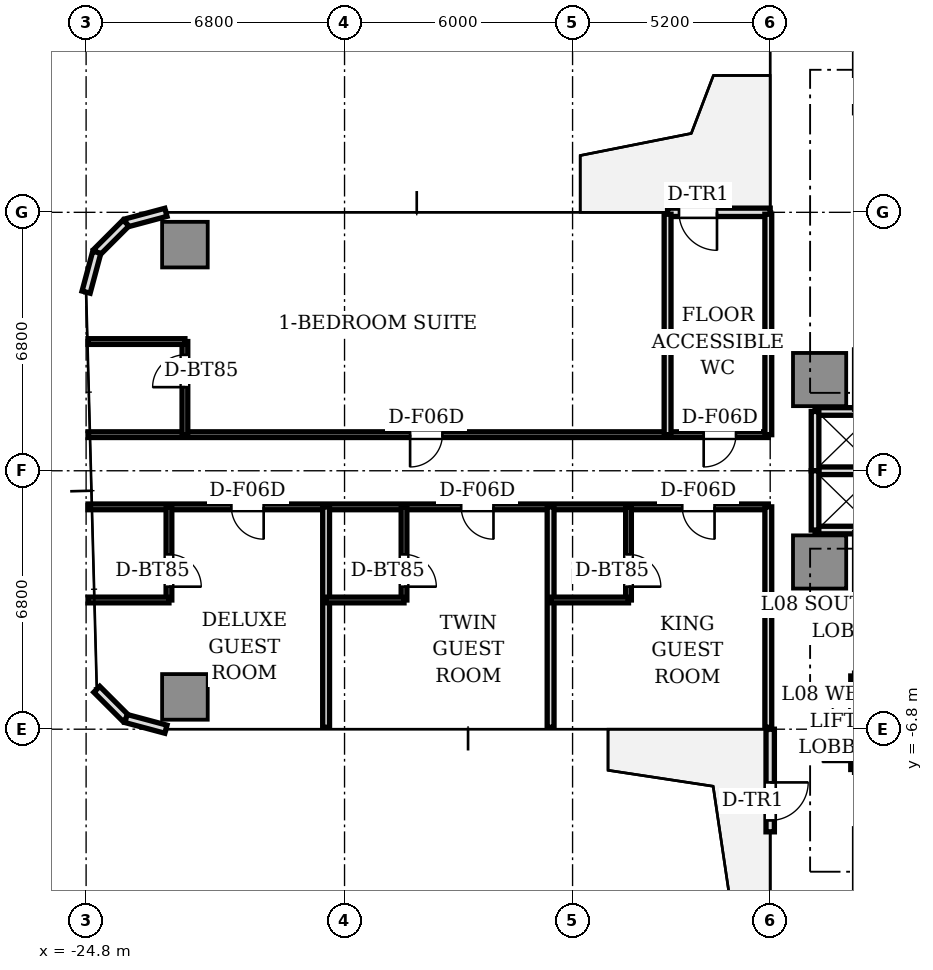
"""IFC4 building model, lengths in metres.
Left out: names, types, materials, properties, quantities, classifications, styles, units other than length and angle.
Written with IfcOpenShell. Run it as: python <this file> out.ifc"""

import sys

from ifc_helpers import new_model, si_unit, direction, frame, frame_2d, origin, origin_2d, place, context, subcontext, project, spatial, rectangle, extrude, source, transform, mapped, element, fill, save


model = new_model("IFC4")
c1 = context("Model", 3, precision=1e-05, world=origin(), true_north=direction((0.0, 1.0)))
c2 = subcontext(c1, "Body", "Model", "MODEL_VIEW")
j1 = project(units=[si_unit("LENGTHUNIT", "METRE"), si_unit("PLANEANGLEUNIT", "RADIAN")], contexts=[c1])
p1 = place(None, origin())
s1 = spatial("IfcSite", under=j1, at=p1, CompositionType="ELEMENT")
p2 = place(p1, origin())
s2 = spatial("IfcBuilding", under=s1, at=p2, CompositionType="ELEMENT")
p3 = place(p2, frame((0.0, 0.0, 33.15)))
s3 = spatial("IfcBuildingStorey", under=s2, at=p3, CompositionType="ELEMENT", Elevation=33.15)
m1 = source(origin(), c2, "Body", "SweptSolid", [
    extrude(rectangle(XDim=1.4, YDim=1.4, at=origin_2d()), origin(), (0.0, 0.0, 1.0), 3.11),
])
for number, where, z_axis, x_axis in (
    (1, (-5.5, 2.4, 0.0), (0.0, 0.0, 1.0), (1.0, 0.0, 0.0)),
    (2, (-5.5, -2.4, 0.0), (0.0, 0.0, 1.0), (1.0, 0.0, 0.0)),
):
    element("IfcColumn", number, at=place(p3, frame(where, z_axis=z_axis, x_axis=x_axis)), inside=s3, PredefinedType="COLUMN", context=c2, shape_type="MappedRepresentation", body=[
        mapped(m1, transform((0.0, 0.0, 0.0), scale=1.0)),
    ])
m2 = source(origin(), c2, "Body", "SweptSolid", [
    extrude(rectangle(XDim=1.2, YDim=1.2, at=origin_2d()), origin(), (0.0, 0.0, 1.0), 3.11),
])
for number, where, z_axis, x_axis in (
    (3, (-22.2, 5.95, 0.0), (0.0, 0.0, 1.0), (1.0, 0.0, 0.0)),
    (4, (-22.2, -5.95, 0.0), (0.0, 0.0, 1.0), (1.0, 0.0, 0.0)),
):
    element("IfcColumn", number, at=place(p3, frame(where, z_axis=z_axis, x_axis=x_axis)), inside=s3, PredefinedType="COLUMN", context=c2, shape_type="MappedRepresentation", body=[
        mapped(m2, transform((0.0, 0.0, 0.0), scale=1.0)),
    ])
p4 = place(p3, frame((-6.8, 6.8, 0.0), z_axis=(0.0, 0.0, 1.0), x_axis=(-1.0, 0.0, 0.0)))
e5 = element("IfcWall", 5, at=p4, inside=s3, PredefinedType="STANDARD", context=c2, shape_type="SweptSolid", body=[
    extrude(rectangle(XDim=2.7, YDim=0.22, at=frame_2d((1.35, 0.0))), origin(), (0.0, 0.0, 1.0), 3.11),
])
p5 = place(p4, frame((1.4, 0.0, 0.0)))
e6 = element("IfcOpeningElement", 6, at=p5, cuts=e5, PredefinedType="OPENING", context=c2, shape_type="SweptSolid", body=[
    extrude(rectangle(XDim=1.0, YDim=2.2, at=frame_2d((0.5, 1.1))), frame((0.0, 0.12, 0.0), z_axis=(0.0, -1.0, 0.0), x_axis=(1.0, 0.0, 0.0)), (0.0, 0.0, 1.0), 0.24),
])
for number, where, z_axis, x_axis in (
    (7, (-22.7, 6.8, 0.0), (0.0, 0.0, 1.0), (-0.966, -0.259, 0.0)),
    (8, (-23.75, 6.519, 0.0), (0.0, 0.0, 1.0), (-0.707, -0.707, 0.0)),
    (9, (-24.519, 5.75, 0.0), (0.0, 0.0, 1.0), (-0.259, -0.966, 0.0)),
    (10, (-24.519, -5.75, 0.0), (0.0, 0.0, 1.0), (0.707, -0.707, 0.0)),
    (11, (-23.75, -6.519, 0.0), (0.0, 0.0, 1.0), (0.966, -0.259, 0.0)),
):
    element("IfcWall", number, at=place(p3, frame(where, z_axis=z_axis, x_axis=x_axis)), inside=s3, PredefinedType="STANDARD", context=c2, shape_type="SweptSolid", body=[
        extrude(rectangle(XDim=1.087, YDim=0.22, at=frame_2d((0.543, 0.0))), origin(), (0.0, 0.0, 1.0), 3.11),
    ])
p6 = place(p3, frame((-6.8, -6.8, 0.0), z_axis=(0.0, 0.0, 1.0), x_axis=(0.0, -1.0, 0.0)))
e12 = element("IfcWall", 12, at=p6, inside=s3, PredefinedType="STANDARD", context=c2, shape_type="SweptSolid", body=[
    extrude(rectangle(XDim=2.7, YDim=0.22, at=frame_2d((1.35, 0.0))), origin(), (0.0, 0.0, 1.0), 3.11),
])
p7 = place(p6, frame((1.4, 0.0, 0.0)))
e13 = element("IfcOpeningElement", 13, at=p7, cuts=e12, PredefinedType="OPENING", context=c2, shape_type="SweptSolid", body=[
    extrude(rectangle(XDim=1.0, YDim=2.2, at=frame_2d((0.5, 1.1))), frame((0.0, 0.12, 0.0), z_axis=(0.0, -1.0, 0.0), x_axis=(1.0, 0.0, 0.0)), (0.0, 0.0, 1.0), 0.24),
])
for number, where, z_axis, x_axis in (
    (14, (-5.62, 1.56, 0.0), (0.0, 0.0, 1.0), (1.0, 0.0, 0.0)),
    (15, (-5.62, -1.56, 0.0), (0.0, 0.0, 1.0), (1.0, 0.0, 0.0)),
    (16, (-5.62, 0.0, 0.0), (0.0, 0.0, 1.0), (1.0, 0.0, 0.0)),
):
    element("IfcWall", number, at=place(p3, frame(where, z_axis=z_axis, x_axis=x_axis)), inside=s3, PredefinedType="SOLIDWALL", context=c2, shape_type="SweptSolid", body=[
        extrude(rectangle(XDim=1.64, YDim=0.2, at=frame_2d((0.82, 0.0))), origin(), (0.0, 0.0, 1.0), 2.66),
    ])
for number, where, z_axis, x_axis in (
    (17, (-5.62, 0.0, 0.0), (0.0, 0.0, 1.0), (0.0, 1.0, 0.0)),
    (18, (-5.62, -1.56, 0.0), (0.0, 0.0, 1.0), (0.0, 1.0, 0.0)),
):
    element("IfcWall", number, at=place(p3, frame(where, z_axis=z_axis, x_axis=x_axis)), inside=s3, PredefinedType="SOLIDWALL", context=c2, shape_type="SweptSolid", body=[
        extrude(rectangle(XDim=1.56, YDim=0.2, at=frame_2d((0.78, 0.0))), origin(), (0.0, 0.0, 1.0), 2.66),
    ])
p8 = place(p3, frame((-4.58, -7.86, 0.0), z_axis=(0.0, 0.0, 1.0), x_axis=(0.0, 1.0, 0.0)))
e19 = element("IfcWall", 19, at=p8, inside=s3, PredefinedType="SOLIDWALL", context=c2, shape_type="SweptSolid", body=[
    extrude(rectangle(XDim=2.46, YDim=0.2, at=frame_2d((1.23, 0.0))), origin(), (0.0, 0.0, 1.0), 2.66),
])
p9 = place(p8, frame((0.2, 0.0, 0.0)))
e20 = element("IfcOpeningElement", 20, at=p9, cuts=e19, PredefinedType="OPENING", context=c2, shape_type="SweptSolid", body=[
    extrude(rectangle(XDim=0.85, YDim=2.1, at=frame_2d((0.425, 1.05))), frame((0.0, 0.11, 0.0), z_axis=(0.0, -1.0, 0.0), x_axis=(1.0, 0.0, 0.0)), (0.0, 0.0, 1.0), 0.22),
])
p10 = place(p8, frame((1.38, 0.0, 0.0)))
e21 = element("IfcOpeningElement", 21, at=p10, cuts=e19, PredefinedType="OPENING", context=c2, shape_type="SweptSolid", body=[
    extrude(rectangle(XDim=0.85, YDim=2.1, at=frame_2d((0.425, 1.05))), frame((0.0, 0.11, 0.0), z_axis=(0.0, -1.0, 0.0), x_axis=(1.0, 0.0, 0.0)), (0.0, 0.0, 1.0), 0.22),
])
p11 = place(p3, frame((-6.85, -0.95, 0.0), z_axis=(0.0, 0.0, 1.0), x_axis=(-1.0, 0.0, 0.0)))
e22 = element("IfcWall", 22, at=p11, inside=s3, PredefinedType="PARTITIONING", context=c2, shape_type="SweptSolid", body=[
    extrude(rectangle(XDim=17.9, YDim=0.15, at=frame_2d((8.95, 0.0))), origin(), (0.0, 0.0, 1.0), 2.66),
])
p12 = place(p11, frame((1.414, 0.0, 0.0)))
e23 = element("IfcOpeningElement", 23, at=p12, cuts=e22, PredefinedType="OPENING", context=c2, shape_type="SweptSolid", body=[
    extrude(rectangle(XDim=0.85, YDim=2.1, at=frame_2d((0.425, 1.05))), frame((0.0, 0.085, 0.0), z_axis=(0.0, -1.0, 0.0), x_axis=(1.0, 0.0, 0.0)), (0.0, 0.0, 1.0), 0.17),
])
p13 = place(p11, frame((7.231, 0.0, 0.0)))
e24 = element("IfcOpeningElement", 24, at=p13, cuts=e22, PredefinedType="OPENING", context=c2, shape_type="SweptSolid", body=[
    extrude(rectangle(XDim=0.85, YDim=2.1, at=frame_2d((0.425, 1.05))), frame((0.0, 0.085, 0.0), z_axis=(0.0, -1.0, 0.0), x_axis=(1.0, 0.0, 0.0)), (0.0, 0.0, 1.0), 0.17),
])
p14 = place(p11, frame((13.278, 0.0, 0.0)))
e25 = element("IfcOpeningElement", 25, at=p14, cuts=e22, PredefinedType="OPENING", context=c2, shape_type="SweptSolid", body=[
    extrude(rectangle(XDim=0.85, YDim=2.1, at=frame_2d((0.425, 1.05))), frame((0.0, 0.085, 0.0), z_axis=(0.0, -1.0, 0.0), x_axis=(1.0, 0.0, 0.0)), (0.0, 0.0, 1.0), 0.17),
])
p15 = place(p3, frame((-6.85, 0.95, 0.0), z_axis=(0.0, 0.0, 1.0), x_axis=(-1.0, 0.0, 0.0)))
e26 = element("IfcWall", 26, at=p15, inside=s3, PredefinedType="PARTITIONING", context=c2, shape_type="SweptSolid", body=[
    extrude(rectangle(XDim=17.9, YDim=0.15, at=frame_2d((8.95, 0.0))), origin(), (0.0, 0.0, 1.0), 2.66),
])
p16 = place(p15, frame((0.85, 0.0, 0.0)))
e27 = element("IfcOpeningElement", 27, at=p16, cuts=e26, PredefinedType="OPENING", context=c2, shape_type="SweptSolid", body=[
    extrude(rectangle(XDim=0.85, YDim=2.1, at=frame_2d((0.425, 1.05))), frame((0.0, 0.085, 0.0), z_axis=(0.0, -1.0, 0.0), x_axis=(1.0, 0.0, 0.0)), (0.0, 0.0, 1.0), 0.17),
])
p17 = place(p15, frame((8.575, 0.0, 0.0)))
e28 = element("IfcOpeningElement", 28, at=p17, cuts=e26, PredefinedType="OPENING", context=c2, shape_type="SweptSolid", body=[
    extrude(rectangle(XDim=0.85, YDim=2.1, at=frame_2d((0.425, 1.05))), frame((0.0, 0.085, 0.0), z_axis=(0.0, -1.0, 0.0), x_axis=(1.0, 0.0, 0.0)), (0.0, 0.0, 1.0), 0.17),
])
for number, where, z_axis, x_axis in (
    (29, (-6.85, -0.95, 0.0), (0.0, 0.0, 1.0), (0.0, -1.0, 0.0)),
    (30, (-6.85, 6.75, 0.0), (0.0, 0.0, 1.0), (0.0, -1.0, 0.0)),
    (31, (-12.578, -0.95, 0.0), (0.0, 0.0, 1.0), (0.0, -1.0, 0.0)),
):
    element("IfcWall", number, at=place(p3, frame(where, z_axis=z_axis, x_axis=x_axis)), inside=s3, PredefinedType="PARTITIONING", context=c2, shape_type="SweptSolid", body=[
        extrude(rectangle(XDim=5.8, YDim=0.18, at=frame_2d((2.9, 0.0))), origin(), (0.0, 0.0, 1.0), 2.66),
    ])
p18 = place(p3, frame((-10.528, -0.95, 0.0), z_axis=(0.0, 0.0, 1.0), x_axis=(0.0, -1.0, 0.0)))
e32 = element("IfcWall", 32, at=p18, inside=s3, PredefinedType="PARTITIONING", context=c2, shape_type="SweptSolid", body=[
    extrude(rectangle(XDim=2.45, YDim=0.15, at=frame_2d((1.225, 0.0))), origin(), (0.0, 0.0, 1.0), 2.66),
])
p19 = place(p18, frame((1.25, 0.0, 0.0)))
e33 = element("IfcOpeningElement", 33, at=p19, cuts=e32, PredefinedType="OPENING", context=c2, shape_type="SweptSolid", body=[
    extrude(rectangle(XDim=0.85, YDim=2.1, at=frame_2d((0.425, 1.05))), frame((0.0, 0.085, 0.0), z_axis=(0.0, -1.0, 0.0), x_axis=(1.0, 0.0, 0.0)), (0.0, 0.0, 1.0), 0.17),
])
p20 = place(p3, frame((-10.528, -3.4, 0.0), z_axis=(0.0, 0.0, 1.0), x_axis=(-1.0, 0.0, 0.0)))
e34 = element("IfcWall", 34, at=p20, inside=s3, PredefinedType="PARTITIONING", context=c2, shape_type="SweptSolid", body=[
    extrude(rectangle(XDim=2.05, YDim=0.15, at=frame_2d((1.025, 0.0))), origin(), (0.0, 0.0, 1.0), 2.63),
])
p21 = place(p3, frame((-18.485, -0.95, 0.0), z_axis=(0.0, 0.0, 1.0), x_axis=(0.0, -1.0, 0.0)))
e35 = element("IfcWall", 35, at=p21, inside=s3, PredefinedType="PARTITIONING", context=c2, shape_type="SweptSolid", body=[
    extrude(rectangle(XDim=5.8, YDim=0.18, at=frame_2d((2.9, 0.0))), origin(), (0.0, 0.0, 1.0), 2.66),
])
p22 = place(p3, frame((-16.435, -0.95, 0.0), z_axis=(0.0, 0.0, 1.0), x_axis=(0.0, -1.0, 0.0)))
e36 = element("IfcWall", 36, at=p22, inside=s3, PredefinedType="PARTITIONING", context=c2, shape_type="SweptSolid", body=[
    extrude(rectangle(XDim=2.45, YDim=0.15, at=frame_2d((1.225, 0.0))), origin(), (0.0, 0.0, 1.0), 2.66),
])
p23 = place(p22, frame((1.25, 0.0, 0.0)))
e37 = element("IfcOpeningElement", 37, at=p23, cuts=e36, PredefinedType="OPENING", context=c2, shape_type="SweptSolid", body=[
    extrude(rectangle(XDim=0.85, YDim=2.1, at=frame_2d((0.425, 1.05))), frame((0.0, 0.085, 0.0), z_axis=(0.0, -1.0, 0.0), x_axis=(1.0, 0.0, 0.0)), (0.0, 0.0, 1.0), 0.17),
])
p24 = place(p3, frame((-16.435, -3.4, 0.0), z_axis=(0.0, 0.0, 1.0), x_axis=(-1.0, 0.0, 0.0)))
e38 = element("IfcWall", 38, at=p24, inside=s3, PredefinedType="PARTITIONING", context=c2, shape_type="SweptSolid", body=[
    extrude(rectangle(XDim=2.05, YDim=0.15, at=frame_2d((1.025, 0.0))), origin(), (0.0, 0.0, 1.0), 2.63),
])
p25 = place(p3, frame((-22.62, -0.95, 0.0), z_axis=(0.0, 0.0, 1.0), x_axis=(0.0, -1.0, 0.0)))
e39 = element("IfcWall", 39, at=p25, inside=s3, PredefinedType="PARTITIONING", context=c2, shape_type="SweptSolid", body=[
    extrude(rectangle(XDim=2.45, YDim=0.15, at=frame_2d((1.225, 0.0))), origin(), (0.0, 0.0, 1.0), 2.66),
])
p26 = place(p25, frame((1.25, 0.0, 0.0)))
e40 = element("IfcOpeningElement", 40, at=p26, cuts=e39, PredefinedType="OPENING", context=c2, shape_type="SweptSolid", body=[
    extrude(rectangle(XDim=0.85, YDim=2.1, at=frame_2d((0.425, 1.05))), frame((0.0, 0.085, 0.0), z_axis=(0.0, -1.0, 0.0), x_axis=(1.0, 0.0, 0.0)), (0.0, 0.0, 1.0), 0.17),
])
p27 = place(p3, frame((-22.62, -3.4, 0.0), z_axis=(0.0, 0.0, 1.0), x_axis=(-1.0, 0.0, 0.0)))
e41 = element("IfcWall", 41, at=p27, inside=s3, PredefinedType="PARTITIONING", context=c2, shape_type="SweptSolid", body=[
    extrude(rectangle(XDim=2.13, YDim=0.15, at=frame_2d((1.065, 0.0))), origin(), (0.0, 0.0, 1.0), 2.66),
])
p28 = place(p3, frame((-9.5, 0.95, 0.0), z_axis=(0.0, 0.0, 1.0), x_axis=(0.0, 1.0, 0.0)))
e42 = element("IfcWall", 42, at=p28, inside=s3, PredefinedType="PARTITIONING", context=c2, shape_type="SweptSolid", body=[
    extrude(rectangle(XDim=5.8, YDim=0.18, at=frame_2d((2.9, 0.0))), origin(), (0.0, 0.0, 1.0), 2.66),
])
p29 = place(p3, frame((-22.2, 0.95, 0.0), z_axis=(0.0, 0.0, 1.0), x_axis=(0.0, 1.0, 0.0)))
e43 = element("IfcWall", 43, at=p29, inside=s3, PredefinedType="PARTITIONING", context=c2, shape_type="SweptSolid", body=[
    extrude(rectangle(XDim=2.45, YDim=0.15, at=frame_2d((1.225, 0.0))), origin(), (0.0, 0.0, 1.0), 2.58),
])
p30 = place(p29, frame((1.25, 0.0, 0.0)))
e44 = element("IfcOpeningElement", 44, at=p30, cuts=e43, PredefinedType="OPENING", context=c2, shape_type="SweptSolid", body=[
    extrude(rectangle(XDim=0.85, YDim=2.1, at=frame_2d((0.425, 1.05))), frame((0.0, 0.085, 0.0), z_axis=(0.0, -1.0, 0.0), x_axis=(1.0, 0.0, 0.0)), (0.0, 0.0, 1.0), 0.17),
])
p31 = place(p3, frame((-22.2, 3.4, 0.0), z_axis=(0.0, 0.0, 1.0), x_axis=(-1.0, 0.0, 0.0)))
e45 = element("IfcWall", 45, at=p31, inside=s3, PredefinedType="PARTITIONING", context=c2, shape_type="SweptSolid", body=[
    extrude(rectangle(XDim=2.55, YDim=0.15, at=frame_2d((1.275, 0.0))), origin(), (0.0, 0.0, 1.0), 2.66),
])
m3 = source(origin(), c2, "Body", "SweptSolid", [
    extrude(rectangle(XDim=1.0, YDim=0.05, at=origin_2d()), origin(), (0.0, 0.0, 1.0), 2.2),
])
p32 = place(p5, frame((0.5, 0.0, 0.0)))
e46 = element("IfcDoor", 46, at=p32, inside=s3, OperationType="SINGLE_SWING_LEFT", PredefinedType="DOOR", context=c2, shape_type="MappedRepresentation", body=[
    mapped(m3, transform((0.0, 0.0, 0.0), scale=1.0)),
])
fill(e6, e46)
p33 = place(p7, frame((0.5, 0.0, 0.0)))
e47 = element("IfcDoor", 47, at=p33, inside=s3, OperationType="SINGLE_SWING_LEFT", PredefinedType="DOOR", context=c2, shape_type="MappedRepresentation", body=[
    mapped(m3, transform((0.0, 0.0, 0.0), scale=1.0)),
])
fill(e13, e47)
m4 = source(origin(), c2, "Body", "SweptSolid", [
    extrude(rectangle(XDim=0.85, YDim=0.05, at=origin_2d()), origin(), (0.0, 0.0, 1.0), 2.1),
])
p34 = place(p19, frame((0.425, 0.0, 0.0)))
e48 = element("IfcDoor", 48, at=p34, inside=s3, OperationType="SINGLE_SWING_RIGHT", PredefinedType="DOOR", context=c2, shape_type="MappedRepresentation", body=[
    mapped(m4, transform((0.0, 0.0, 0.0), scale=1.0)),
])
fill(e33, e48)
p35 = place(p12, frame((0.425, 0.0, 0.0)))
e49 = element("IfcDoor", 49, at=p35, inside=s3, OperationType="SINGLE_SWING_LEFT", PredefinedType="DOOR", context=c2, shape_type="MappedRepresentation", body=[
    mapped(m4, transform((0.0, 0.0, 0.0), scale=1.0)),
])
fill(e23, e49)
p36 = place(p23, frame((0.425, 0.0, 0.0)))
e50 = element("IfcDoor", 50, at=p36, inside=s3, OperationType="SINGLE_SWING_RIGHT", PredefinedType="DOOR", context=c2, shape_type="MappedRepresentation", body=[
    mapped(m4, transform((0.0, 0.0, 0.0), scale=1.0)),
])
fill(e37, e50)
p37 = place(p13, frame((0.425, 0.0, 0.0)))
e51 = element("IfcDoor", 51, at=p37, inside=s3, OperationType="SINGLE_SWING_LEFT", PredefinedType="DOOR", context=c2, shape_type="MappedRepresentation", body=[
    mapped(m4, transform((0.0, 0.0, 0.0), scale=1.0)),
])
fill(e24, e51)
p38 = place(p26, frame((0.425, 0.0, 0.0)))
e52 = element("IfcDoor", 52, at=p38, inside=s3, OperationType="SINGLE_SWING_RIGHT", PredefinedType="DOOR", context=c2, shape_type="MappedRepresentation", body=[
    mapped(m4, transform((0.0, 0.0, 0.0), scale=1.0)),
])
fill(e40, e52)
p39 = place(p14, frame((0.425, 0.0, 0.0)))
e53 = element("IfcDoor", 53, at=p39, inside=s3, OperationType="SINGLE_SWING_LEFT", PredefinedType="DOOR", context=c2, shape_type="MappedRepresentation", body=[
    mapped(m4, transform((0.0, 0.0, 0.0), scale=1.0)),
])
fill(e25, e53)
p40 = place(p16, frame((0.425, 0.0, 0.0)))
e54 = element("IfcDoor", 54, at=p40, inside=s3, OperationType="SINGLE_SWING_RIGHT", PredefinedType="DOOR", context=c2, shape_type="MappedRepresentation", body=[
    mapped(m4, transform((0.0, 0.0, 0.0), scale=1.0)),
])
fill(e27, e54)
p41 = place(p30, frame((0.425, 0.0, 0.0)))
e55 = element("IfcDoor", 55, at=p41, inside=s3, OperationType="SINGLE_SWING_LEFT", PredefinedType="DOOR", context=c2, shape_type="MappedRepresentation", body=[
    mapped(m4, transform((0.0, 0.0, 0.0), scale=1.0)),
])
fill(e44, e55)
p42 = place(p17, frame((0.425, 0.0, 0.0)))
e56 = element("IfcDoor", 56, at=p42, inside=s3, OperationType="SINGLE_SWING_RIGHT", PredefinedType="DOOR", context=c2, shape_type="MappedRepresentation", body=[
    mapped(m4, transform((0.0, 0.0, 0.0), scale=1.0)),
])
fill(e28, e56)
save(model, sys.argv[1])
